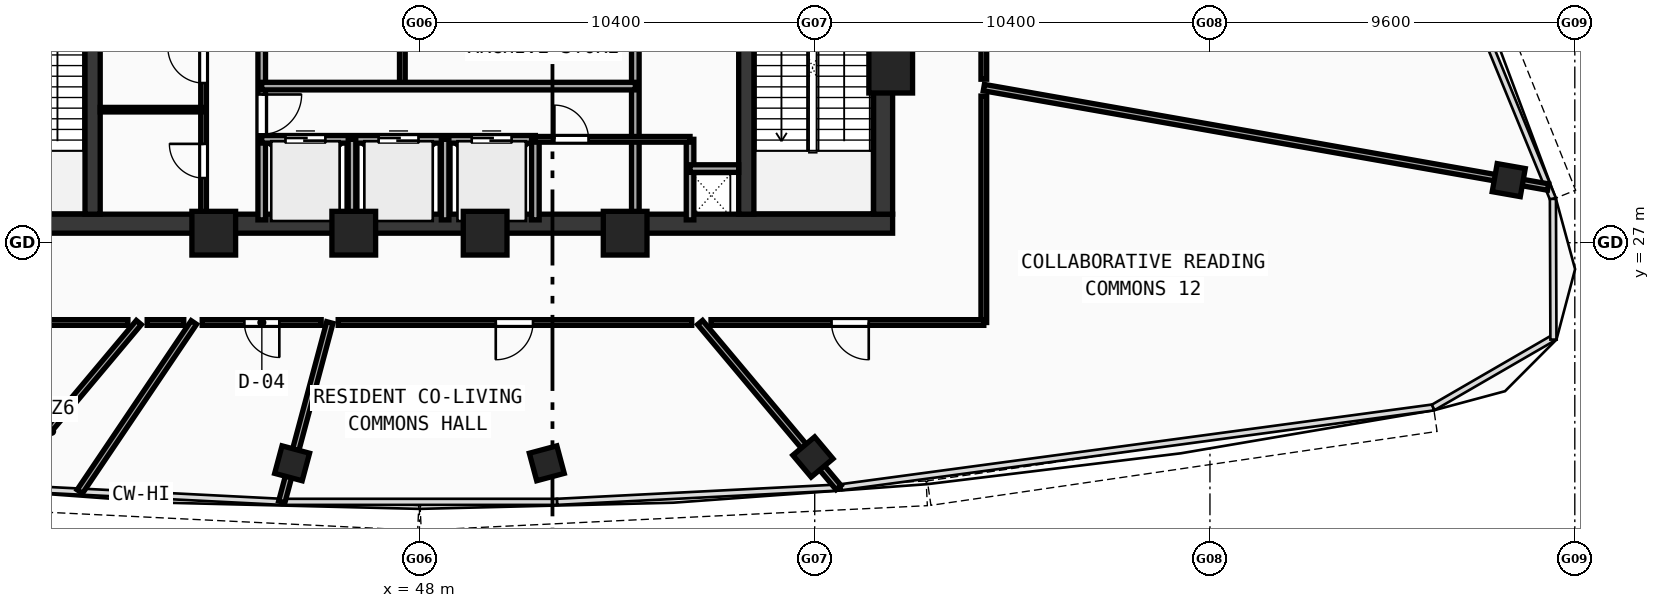
"""IFC4 building model, lengths in metres.
Left out: names, types, materials, properties, quantities, classifications, styles, units other than length and angle.
Written with IfcOpenShell. Run it as: python <this file> out.ifc"""

import sys

from ifc_helpers import new_model, si_unit, direction, frame, frame_2d, origin, origin_with_axes, origin_2d, place, context, subcontext, project, spatial, rectangle, hollow_rectangle, extrude, source, transform, mapped, element, fill, save


model = new_model("IFC4")
c1 = context("Model", 3, precision=1e-05, world=origin(), true_north=direction((0.0, 1.0)))
c2 = subcontext(c1, "Body", "Model", "MODEL_VIEW")
j1 = project(units=[si_unit("LENGTHUNIT", "METRE"), si_unit("PLANEANGLEUNIT", "RADIAN")], contexts=[c1])
p1 = place(None, origin())
s1 = spatial("IfcSite", under=j1, at=p1, CompositionType="ELEMENT")
p2 = place(p1, origin())
s2 = spatial("IfcBuilding", under=s1, at=p2, CompositionType="ELEMENT")
p3 = place(p2, frame((0.0, 0.0, 314.86)))
s3 = spatial("IfcBuildingStorey", under=s2, at=p3, CompositionType="ELEMENT", Elevation=314.86)
p4 = place(p3, frame((35.55, 27.5, 0.0), z_axis=(0.0, 0.0, 1.0), x_axis=(1.0, 0.0, 0.0)))
e1 = element("IfcWall", 1, at=p4, inside=s3, PredefinedType="SHEAR", context=c2, shape_type="SweptSolid", body=[
    extrude(rectangle(XDim=24.9, YDim=0.5, at=frame_2d((12.45, 0.0))), origin(), (0.0, 0.0, 1.0), 5.57),
])
p5 = place(p3, frame((60.2, 27.75, 0.0), z_axis=(0.0, 0.0, 1.0), x_axis=(0.0, 1.0, 0.0)))
e2 = element("IfcWall", 2, at=p5, inside=s3, PredefinedType="SHEAR", context=c2, shape_type="SweptSolid", body=[
    extrude(rectangle(XDim=12.2, YDim=0.5, at=frame_2d((6.1, 0.0))), origin(), (0.0, 0.0, 1.0), 5.57),
])
p6 = place(p3, frame((39.4, 27.75, 0.0), z_axis=(0.0, 0.0, 1.0), x_axis=(0.0, 1.0, 0.0)))
e3 = element("IfcWall", 3, at=p6, inside=s3, PredefinedType="SHEAR", context=c2, shape_type="SweptSolid", body=[
    extrude(rectangle(XDim=12.2, YDim=0.4, at=frame_2d((6.1, 0.0))), origin(), (0.0, 0.0, 1.0), 5.57),
])
p7 = place(p6, frame((10.0, 0.0, 0.0)))
e4 = element("IfcOpeningElement", 4, at=p7, cuts=e3, PredefinedType="OPENING", context=c2, shape_type="SweptSolid", body=[
    extrude(rectangle(XDim=1.1, YDim=2.1, at=frame_2d((0.55, 1.05))), frame((0.0, 0.21, 0.0), z_axis=(0.0, -1.0, 0.0), x_axis=(1.0, 0.0, 0.0)), (0.0, 0.0, 1.0), 0.42),
])
p8 = place(p3, frame((56.6, 27.75, 0.0), z_axis=(0.0, 0.0, 1.0), x_axis=(0.0, 1.0, 0.0)))
e5 = element("IfcWall", 5, at=p8, inside=s3, PredefinedType="SHEAR", context=c2, shape_type="SweptSolid", body=[
    extrude(rectangle(XDim=12.2, YDim=0.4, at=frame_2d((6.1, 0.0))), origin(), (0.0, 0.0, 1.0), 5.57),
])
p9 = place(p8, frame((10.0, 0.0, 0.0)))
e6 = element("IfcOpeningElement", 6, at=p9, cuts=e5, PredefinedType="OPENING", context=c2, shape_type="SweptSolid", body=[
    extrude(rectangle(XDim=1.1, YDim=2.1, at=frame_2d((0.55, 1.05))), frame((0.0, 0.21, 0.0), z_axis=(0.0, -1.0, 0.0), x_axis=(1.0, 0.0, 0.0)), (0.0, 0.0, 1.0), 0.42),
])
m1 = source(origin(), c2, "Body", "SweptSolid", [
    extrude(hollow_rectangle(XDim=1.15, YDim=1.15, WallThickness=0.048, at=origin_2d()), origin(), (0.0, 0.0, 1.0), 5.83),
])
for number, where, z_axis, x_axis in (
    (7, (42.588, 27.25, -0.26), (0.0, 0.0, 1.0), (1.0, 0.0, 0.0)),
    (8, (46.272, 27.25, -0.26), (0.0, 0.0, 1.0), (1.0, 0.0, 0.0)),
    (9, (49.729, 27.25, -0.26), (0.0, 0.0, 1.0), (1.0, 0.0, 0.0)),
    (10, (53.412, 27.25, -0.26), (0.0, 0.0, 1.0), (1.0, 0.0, 0.0)),
    (11, (60.4, 31.513, -0.26), (0.0, 0.0, 1.0), (1.0, 0.0, 0.0)),
):
    element("IfcColumn", number, at=place(p3, frame(where, z_axis=z_axis, x_axis=x_axis)), inside=s3, PredefinedType="COLUMN", context=c2, shape_type="MappedRepresentation", body=[
        mapped(m1, transform((0.0, 0.0, 0.0), scale=1.0)),
    ])
m2 = source(origin(), c2, "Body", "SweptSolid", [
    extrude(hollow_rectangle(XDim=0.75, YDim=0.75, WallThickness=0.028, at=origin_2d()), origin(), (0.0, 0.0, 1.0), 5.83),
])
for number, where, z_axis, x_axis in (
    (12, (44.649, 21.196, -0.26), (0.0, 0.0, 1.0), (0.966, -0.259, 0.0)),
    (13, (51.351, 21.196, -0.26), (0.0, 0.0, 1.0), (0.966, 0.259, 0.0)),
    (14, (58.354, 21.362, -0.26), (0.0, 0.0, 1.0), (0.766, 0.643, 0.0)),
    (15, (76.662, 28.646, -0.26), (0.0, 0.0, 1.0), (0.174, 0.985, 0.0)),
):
    element("IfcColumn", number, at=place(p3, frame(where, z_axis=z_axis, x_axis=x_axis)), inside=s3, PredefinedType="COLUMN", context=c2, shape_type="MappedRepresentation", body=[
        mapped(m2, transform((0.0, 0.0, 0.0), scale=1.0)),
    ])
p10 = place(p3, frame((43.85, 27.6, 0.0), z_axis=(0.0, 0.0, 1.0), x_axis=(0.0, 1.0, 0.0)))
e16 = element("IfcWall", 16, at=p10, inside=s3, PredefinedType="SOLIDWALL", context=c2, shape_type="SweptSolid", body=[
    extrude(rectangle(XDim=6.22, YDim=0.2, at=frame_2d((3.11, 0.0))), origin(), (0.0, 0.0, 1.0), 5.57),
])
p11 = place(p10, frame((2.25, 0.0, 0.0)))
e17 = element("IfcOpeningElement", 17, at=p11, cuts=e16, PredefinedType="OPENING", context=c2, shape_type="SweptSolid", body=[
    extrude(rectangle(XDim=1.05, YDim=2.1, at=frame_2d((0.525, 1.05))), frame((0.0, 0.11, 0.0), z_axis=(0.0, -1.0, 0.0), x_axis=(1.0, 0.0, 0.0)), (0.0, 0.0, 1.0), 0.22),
])
p12 = place(p3, frame((53.68, 27.6, 0.0), z_axis=(0.0, 0.0, 1.0), x_axis=(0.0, 1.0, 0.0)))
e18 = element("IfcWall", 18, at=p12, inside=s3, PredefinedType="SOLIDWALL", context=c2, shape_type="SweptSolid", body=[
    extrude(rectangle(XDim=9.05, YDim=0.2, at=frame_2d((4.525, 0.0))), origin(), (0.0, 0.0, 1.0), 2.22),
])
p13 = place(p12, frame((6.9, 0.0, 0.0)))
e19 = element("IfcOpeningElement", 19, at=p13, cuts=e18, PredefinedType="OPENING", context=c2, shape_type="SweptSolid", body=[
    extrude(rectangle(XDim=1.05, YDim=2.1, at=frame_2d((0.525, 1.05))), frame((0.0, 0.11, 0.0), z_axis=(0.0, -1.0, 0.0), x_axis=(1.0, 0.0, 0.0)), (0.0, 0.0, 1.0), 0.22),
])
p14 = place(p3, frame((47.55, 31.12, 0.0), z_axis=(0.0, 0.0, 1.0), x_axis=(0.0, 1.0, 0.0)))
e20 = element("IfcWall", 20, at=p14, inside=s3, PredefinedType="PARTITIONING", context=c2, shape_type="SweptSolid", body=[
    extrude(rectangle(XDim=2.7, YDim=0.15, at=frame_2d((1.35, 0.0))), origin(), (0.0, 0.0, 1.0), 5.57),
])
p15 = place(p3, frame((43.85, 29.72, 0.0), z_axis=(0.0, 0.0, 1.0), x_axis=(1.0, 0.0, 0.0)))
e21 = element("IfcWall", 21, at=p15, inside=s3, PredefinedType="SOLIDWALL", context=c2, shape_type="SweptSolid", body=[
    extrude(rectangle(XDim=7.2, YDim=0.2, at=frame_2d((3.6, 0.0))), origin(), (0.0, 0.0, 1.0), 5.57),
])
p16 = place(p15, frame((0.625, 0.0, 0.0)))
e22 = element("IfcOpeningElement", 22, at=p16, cuts=e21, PredefinedType="OPENING", context=c2, shape_type="SweptSolid", body=[
    extrude(rectangle(XDim=1.05, YDim=2.1, at=frame_2d((0.525, 1.05))), frame((0.0, 0.11, 0.0), z_axis=(0.0, -1.0, 0.0), x_axis=(1.0, 0.0, 0.0)), (0.0, 0.0, 1.0), 0.22),
])
p17 = place(p15, frame((3.075, 0.0, 0.0)))
e23 = element("IfcOpeningElement", 23, at=p17, cuts=e21, PredefinedType="OPENING", context=c2, shape_type="SweptSolid", body=[
    extrude(rectangle(XDim=1.05, YDim=2.1, at=frame_2d((0.525, 1.05))), frame((0.0, 0.11, 0.0), z_axis=(0.0, -1.0, 0.0), x_axis=(1.0, 0.0, 0.0)), (0.0, 0.0, 1.0), 0.22),
])
p18 = place(p15, frame((5.525, 0.0, 0.0)))
e24 = element("IfcOpeningElement", 24, at=p18, cuts=e21, PredefinedType="OPENING", context=c2, shape_type="SweptSolid", body=[
    extrude(rectangle(XDim=1.05, YDim=2.1, at=frame_2d((0.525, 1.05))), frame((0.0, 0.11, 0.0), z_axis=(0.0, -1.0, 0.0), x_axis=(1.0, 0.0, 0.0)), (0.0, 0.0, 1.0), 0.22),
])
p19 = place(p3, frame((51.05, 27.6, 0.0), z_axis=(0.0, 0.0, 1.0), x_axis=(0.0, 1.0, 0.0)))
e25 = element("IfcWall", 25, at=p19, inside=s3, PredefinedType="SOLIDWALL", context=c2, shape_type="SweptSolid", body=[
    extrude(rectangle(XDim=2.12, YDim=0.2, at=frame_2d((1.06, 0.0))), origin(), (0.0, 0.0, 1.0), 5.57),
])
p20 = place(p3, frame((43.85, 31.12, 0.0), z_axis=(0.0, 0.0, 1.0), x_axis=(1.0, 0.0, 0.0)))
e26 = element("IfcWall", 26, at=p20, inside=s3, PredefinedType="SOLIDWALL", context=c2, shape_type="SweptSolid", body=[
    extrude(rectangle(XDim=9.83, YDim=0.2, at=frame_2d((4.915, 0.0))), origin(), (0.0, 0.0, 1.0), 5.57),
])
p21 = place(p3, frame((46.225, 27.6, 0.0), z_axis=(0.0, 0.0, 1.0), x_axis=(0.0, 1.0, 0.0)))
e27 = element("IfcWall", 27, at=p21, inside=s3, PredefinedType="SOLIDWALL", context=c2, shape_type="SweptSolid", body=[
    extrude(rectangle(XDim=2.12, YDim=0.2, at=frame_2d((1.06, 0.0))), origin(), (0.0, 0.0, 1.0), 2.22),
])
for number, where, z_axis, x_axis in (
    (28, (48.675, 27.6, 0.0), (0.0, 0.0, 1.0), (0.0, 1.0, 0.0)),
    (29, (55.12, 27.6, 0.0), (0.0, 0.0, 1.0), (0.0, 1.0, 0.0)),
):
    element("IfcWall", number, at=place(p3, frame(where, z_axis=z_axis, x_axis=x_axis)), inside=s3, PredefinedType="SOLIDWALL", context=c2, shape_type="SweptSolid", body=[
        extrude(rectangle(XDim=2.12, YDim=0.2, at=frame_2d((1.06, 0.0))), origin(), (0.0, 0.0, 1.0), 5.57),
    ])
p22 = place(p3, frame((55.12, 28.95, 0.0), z_axis=(0.0, 0.0, 1.0), x_axis=(1.0, 0.0, 0.0)))
e30 = element("IfcWall", 30, at=p22, inside=s3, PredefinedType="SOLIDWALL", context=c2, shape_type="SweptSolid", body=[
    extrude(rectangle(XDim=1.28, YDim=0.2, at=frame_2d((0.64, 0.0))), origin(), (0.0, 0.0, 1.0), 5.57),
])
p23 = place(p3, frame((42.32, 27.6, 0.0), z_axis=(0.0, 0.0, 1.0), x_axis=(0.0, 1.0, 0.0)))
e31 = element("IfcWall", 31, at=p23, inside=s3, PredefinedType="PARTITIONING", context=c2, shape_type="SweptSolid", body=[
    extrude(rectangle(XDim=5.9, YDim=0.15, at=frame_2d((2.95, 0.0))), origin(), (0.0, 0.0, 1.0), 2.22),
])
p24 = place(p23, frame((1.1, 0.0, 0.0)))
e32 = element("IfcOpeningElement", 32, at=p24, cuts=e31, PredefinedType="OPENING", context=c2, shape_type="SweptSolid", body=[
    extrude(rectangle(XDim=0.9, YDim=2.1, at=frame_2d((0.45, 1.05))), frame((0.0, 0.085, 0.0), z_axis=(0.0, -1.0, 0.0), x_axis=(1.0, 0.0, 0.0)), (0.0, 0.0, 1.0), 0.17),
])
p25 = place(p23, frame((3.6, 0.0, 0.0)))
e33 = element("IfcOpeningElement", 33, at=p25, cuts=e31, PredefinedType="OPENING", context=c2, shape_type="SweptSolid", body=[
    extrude(rectangle(XDim=0.94, YDim=2.1, at=frame_2d((0.47, 1.05))), frame((0.0, 0.085, 0.0), z_axis=(0.0, -1.0, 0.0), x_axis=(1.0, 0.0, 0.0)), (0.0, 0.0, 1.0), 0.17),
])
p26 = place(p3, frame((51.05, 29.72, 0.0), z_axis=(0.0, 0.0, 1.0), x_axis=(1.0, 0.0, 0.0)))
e34 = element("IfcWall", 34, at=p26, inside=s3, PredefinedType="PARTITIONING", context=c2, shape_type="SweptSolid", body=[
    extrude(rectangle(XDim=4.07, YDim=0.15, at=frame_2d((2.035, 0.0))), origin(), (0.0, 0.0, 1.0), 5.57),
])
p27 = place(p26, frame((0.5, 0.0, 0.0)))
e35 = element("IfcOpeningElement", 35, at=p27, cuts=e34, PredefinedType="OPENING", context=c2, shape_type="SweptSolid", body=[
    extrude(rectangle(XDim=0.9, YDim=2.1, at=frame_2d((0.45, 1.05))), frame((0.0, 0.085, 0.0), z_axis=(0.0, -1.0, 0.0), x_axis=(1.0, 0.0, 0.0)), (0.0, 0.0, 1.0), 0.17),
])
p28 = place(p3, frame((39.6, 30.5, 0.0), z_axis=(0.0, 0.0, 1.0), x_axis=(1.0, 0.0, 0.0)))
e36 = element("IfcWall", 36, at=p28, inside=s3, PredefinedType="PARTITIONING", context=c2, shape_type="SweptSolid", body=[
    extrude(rectangle(XDim=2.72, YDim=0.12, at=frame_2d((1.36, 0.0))), origin(), (0.0, 0.0, 1.0), 5.57),
])
p29 = place(p3, frame((40.616, 24.9, 0.0), z_axis=(0.0, 0.0, 1.0), x_axis=(-0.642790029712, -0.76604241247, 0.0)))
e37 = element("IfcWall", 37, at=p29, inside=s3, PredefinedType="PARTITIONING", context=c2, shape_type="SweptSolid", body=[
    extrude(rectangle(XDim=5.669, YDim=0.17, at=frame_2d((2.834, 0.0))), origin(), (0.0, 0.0, 1.0), 2.22),
])
p30 = place(p3, frame((42.064, 24.9, 0.0), z_axis=(0.0, 0.0, 1.0), x_axis=(-0.559175120789, -0.829049566848, 0.0)))
e38 = element("IfcWall", 38, at=p30, inside=s3, PredefinedType="PARTITIONING", context=c2, shape_type="SweptSolid", body=[
    extrude(rectangle(XDim=5.366, YDim=0.17, at=frame_2d((2.683, 0.0))), origin(), (0.0, 0.0, 1.0), 4.97),
])
p31 = place(p3, frame((45.642, 24.9, 0.0), z_axis=(0.0, 0.0, 1.0), x_axis=(-0.258835177065, -0.965921503598, 0.0)))
e39 = element("IfcWall", 39, at=p31, inside=s3, PredefinedType="PARTITIONING", context=c2, shape_type="SweptSolid", body=[
    extrude(rectangle(XDim=4.885, YDim=0.17, at=frame_2d((2.442, 0.0))), origin(), (0.0, 0.0, 1.0), 2.22),
])
p32 = place(p3, frame((55.384, 24.9, 0.0), z_axis=(0.0, 0.0, 1.0), x_axis=(0.642790029712, -0.76604241247, 0.0)))
e40 = element("IfcWall", 40, at=p32, inside=s3, PredefinedType="PARTITIONING", context=c2, shape_type="SweptSolid", body=[
    extrude(rectangle(XDim=5.669, YDim=0.17, at=frame_2d((2.834, 0.0))), origin(), (0.0, 0.0, 1.0), 2.22),
])
p33 = place(p3, frame((62.85, 31.082, 0.0), z_axis=(0.0, 0.0, 1.0), x_axis=(0.984808005161, -0.173646747654, 0.0)))
e41 = element("IfcWall", 41, at=p33, inside=s3, PredefinedType="PARTITIONING", context=c2, shape_type="SweptSolid", body=[
    extrude(rectangle(XDim=15.075, YDim=0.17, at=frame_2d((7.537, 0.0))), origin(), (0.0, 0.0, 1.0), 2.22),
])
p34 = place(p3, frame((62.85, 38.305, 0.0), z_axis=(0.0, 0.0, 1.0), x_axis=(0.0, -1.0, 0.0)))
e42 = element("IfcWall", 42, at=p34, inside=s3, PredefinedType="PARTITIONING", context=c2, shape_type="SweptSolid", body=[
    extrude(rectangle(XDim=7.004, YDim=0.15, at=frame_2d((3.502, 0.0))), origin(), (0.0, 0.0, 1.0), 2.22),
])
p35 = place(p34, frame((3.027, 0.0, 0.0)))
e43 = element("IfcOpeningElement", 43, at=p35, cuts=e42, PredefinedType="OPENING", context=c2, shape_type="SweptSolid", body=[
    extrude(rectangle(XDim=0.98, YDim=2.12, at=frame_2d((0.49, 1.06))), frame((0.0, 0.085, 0.0), z_axis=(0.0, -1.0, 0.0), x_axis=(1.0, 0.0, 0.0)), (0.0, 0.0, 1.0), 0.17),
])
p36 = place(p3, frame((62.85, 30.858, 0.0), z_axis=(0.0, 0.0, 1.0), x_axis=(0.0, -1.0, 0.0)))
e44 = element("IfcWall", 44, at=p36, inside=s3, PredefinedType="PARTITIONING", context=c2, shape_type="SweptSolid", body=[
    extrude(rectangle(XDim=5.958, YDim=0.15, at=frame_2d((2.979, 0.0))), origin(), (0.0, 0.0, 1.0), 2.22),
])
p37 = place(p3, frame((62.85, 24.9, 0.0), z_axis=(0.0, 0.0, 1.0), x_axis=(-1.0, 0.0, 0.0)))
e45 = element("IfcWall", 45, at=p37, inside=s3, PredefinedType="PARTITIONING", context=c2, shape_type="SweptSolid", body=[
    extrude(rectangle(XDim=7.179, YDim=0.15, at=frame_2d((3.589, 0.0))), origin(), (0.0, 0.0, 1.0), 2.22),
])
p38 = place(p37, frame((3.028, 0.0, 0.0)))
e46 = element("IfcOpeningElement", 46, at=p38, cuts=e45, PredefinedType="OPENING", context=c2, shape_type="SweptSolid", body=[
    extrude(rectangle(XDim=0.98, YDim=2.12, at=frame_2d((0.49, 1.06))), frame((0.0, 0.085, 0.0), z_axis=(0.0, -1.0, 0.0), x_axis=(1.0, 0.0, 0.0)), (0.0, 0.0, 1.0), 0.17),
])
p39 = place(p3, frame((55.164, 24.9, 0.0), z_axis=(0.0, 0.0, 1.0), x_axis=(-1.0, 0.0, 0.0)))
e47 = element("IfcWall", 47, at=p39, inside=s3, PredefinedType="PARTITIONING", context=c2, shape_type="SweptSolid", body=[
    extrude(rectangle(XDim=9.302, YDim=0.15, at=frame_2d((4.651, 0.0))), origin(), (0.0, 0.0, 1.0), 2.22),
])
p40 = place(p39, frame((4.176, 0.0, 0.0)))
e48 = element("IfcOpeningElement", 48, at=p40, cuts=e47, PredefinedType="OPENING", context=c2, shape_type="SweptSolid", body=[
    extrude(rectangle(XDim=0.98, YDim=2.12, at=frame_2d((0.49, 1.06))), frame((0.0, 0.085, 0.0), z_axis=(0.0, -1.0, 0.0), x_axis=(1.0, 0.0, 0.0)), (0.0, 0.0, 1.0), 0.17),
])
p41 = place(p3, frame((45.414, 24.9, 0.0), z_axis=(0.0, 0.0, 1.0), x_axis=(-1.0, 0.0, 0.0)))
e49 = element("IfcWall", 49, at=p41, inside=s3, PredefinedType="PARTITIONING", context=c2, shape_type="SweptSolid", body=[
    extrude(rectangle(XDim=3.13, YDim=0.15, at=frame_2d((1.565, 0.0))), origin(), (0.0, 0.0, 1.0), 2.22),
])
p42 = place(p41, frame((1.101, 0.0, 0.0)))
e50 = element("IfcOpeningElement", 50, at=p42, cuts=e49, PredefinedType="OPENING", context=c2, shape_type="SweptSolid", body=[
    extrude(rectangle(XDim=0.92, YDim=2.1, at=frame_2d((0.46, 1.05))), frame((0.0, 0.085, 0.0), z_axis=(0.0, -1.0, 0.0), x_axis=(1.0, 0.0, 0.0)), (0.0, 0.0, 1.0), 0.17),
])
p43 = place(p3, frame((41.799, 24.9, 0.0), z_axis=(0.0, 0.0, 1.0), x_axis=(-1.0, 0.0, 0.0)))
e51 = element("IfcWall", 51, at=p43, inside=s3, PredefinedType="PARTITIONING", context=c2, shape_type="SweptSolid", body=[
    extrude(rectangle(XDim=0.963, YDim=0.15, at=frame_2d((0.481, 0.0))), origin(), (0.0, 0.0, 1.0), 2.22),
])
p44 = place(p3, frame((40.329, 24.9, 0.0), z_axis=(0.0, 0.0, 1.0), x_axis=(-1.0, 0.0, 0.0)))
e52 = element("IfcWall", 52, at=p44, inside=s3, PredefinedType="PARTITIONING", context=c2, shape_type="SweptSolid", body=[
    extrude(rectangle(XDim=7.179, YDim=0.15, at=frame_2d((3.589, 0.0))), origin(), (0.0, 0.0, 1.0), 2.22),
])
p45 = place(p44, frame((3.201, 0.0, 0.0)))
e53 = element("IfcOpeningElement", 53, at=p45, cuts=e52, PredefinedType="OPENING", context=c2, shape_type="SweptSolid", body=[
    extrude(rectangle(XDim=0.98, YDim=2.12, at=frame_2d((0.49, 1.06))), frame((0.0, 0.085, 0.0), z_axis=(0.0, -1.0, 0.0), x_axis=(1.0, 0.0, 0.0)), (0.0, 0.0, 1.0), 0.17),
])
m3 = source(origin(), c2, "Body", "SweptSolid", [
    extrude(rectangle(XDim=1.05, YDim=2.1, at=frame_2d((0.525, 1.05))), frame((0.0, 0.025, 0.0), z_axis=(0.0, -1.0, 0.0), x_axis=(1.0, 0.0, 0.0)), (0.0, 0.0, 1.0), 0.05),
])
p46 = place(p11, frame((1.05, 0.0, 0.0), z_axis=(0.0, 0.0, 1.0), x_axis=(-1.0, 0.0, 0.0)))
e54 = element("IfcDoor", 54, at=p46, inside=s3, OperationType="SINGLE_SWING_LEFT", PredefinedType="DOOR", context=c2, shape_type="MappedRepresentation", body=[
    mapped(m3, transform((0.0, 0.0, 0.0), scale=1.0)),
])
fill(e17, e54)
p47 = place(p16, origin_with_axes())
e55 = element("IfcDoor", 55, at=p47, inside=s3, OperationType="DOUBLE_DOOR_SLIDING", PredefinedType="DOOR", context=c2, shape_type="MappedRepresentation", body=[
    mapped(m3, transform((0.0, 0.0, 0.0), scale=1.0)),
])
fill(e22, e55)
p48 = place(p17, origin_with_axes())
e56 = element("IfcDoor", 56, at=p48, inside=s3, OperationType="DOUBLE_DOOR_SLIDING", PredefinedType="DOOR", context=c2, shape_type="MappedRepresentation", body=[
    mapped(m3, transform((0.0, 0.0, 0.0), scale=1.0)),
])
fill(e23, e56)
p49 = place(p18, origin_with_axes())
e57 = element("IfcDoor", 57, at=p49, inside=s3, OperationType="DOUBLE_DOOR_SLIDING", PredefinedType="DOOR", context=c2, shape_type="MappedRepresentation", body=[
    mapped(m3, transform((0.0, 0.0, 0.0), scale=1.0)),
])
fill(e24, e57)
m4 = source(origin(), c2, "Body", "SweptSolid", [
    extrude(rectangle(XDim=0.9, YDim=2.1, at=frame_2d((0.45, 1.05))), frame((0.0, 0.025, 0.0), z_axis=(0.0, -1.0, 0.0), x_axis=(1.0, 0.0, 0.0)), (0.0, 0.0, 1.0), 0.05),
])
p50 = place(p24, origin_with_axes())
e58 = element("IfcDoor", 58, at=p50, inside=s3, OperationType="SINGLE_SWING_RIGHT", PredefinedType="DOOR", context=c2, shape_type="MappedRepresentation", body=[
    mapped(m4, transform((0.0, 0.0, 0.0), scale=1.0)),
])
fill(e32, e58)
m5 = source(origin(), c2, "Body", "SweptSolid", [
    extrude(rectangle(XDim=0.94, YDim=2.1, at=frame_2d((0.47, 1.05))), frame((0.0, 0.025, 0.0), z_axis=(0.0, -1.0, 0.0), x_axis=(1.0, 0.0, 0.0)), (0.0, 0.0, 1.0), 0.05),
])
p51 = place(p25, origin_with_axes())
e59 = element("IfcDoor", 59, at=p51, inside=s3, OperationType="SINGLE_SWING_RIGHT", PredefinedType="DOOR", context=c2, shape_type="MappedRepresentation", body=[
    mapped(m5, transform((0.0, 0.0, 0.0), scale=1.0)),
])
fill(e33, e59)
p52 = place(p27, origin_with_axes())
e60 = element("IfcDoor", 60, at=p52, inside=s3, OperationType="SINGLE_SWING_LEFT", PredefinedType="DOOR", context=c2, shape_type="MappedRepresentation", body=[
    mapped(m4, transform((0.0, 0.0, 0.0), scale=1.0)),
])
fill(e35, e60)
m6 = source(origin(), c2, "Body", "SweptSolid", [
    extrude(rectangle(XDim=0.92, YDim=2.1, at=frame_2d((0.46, 1.05))), frame((0.0, 0.025, 0.0), z_axis=(0.0, -1.0, 0.0), x_axis=(1.0, 0.0, 0.0)), (0.0, 0.0, 1.0), 0.05),
])
p53 = place(p42, origin_with_axes())
e61 = element("IfcDoor", 61, at=p53, inside=s3, OperationType="SINGLE_SWING_LEFT", PredefinedType="DOOR", context=c2, shape_type="MappedRepresentation", body=[
    mapped(m6, transform((0.0, 0.0, 0.0), scale=1.0)),
])
fill(e50, e61)
m7 = source(origin(), c2, "Body", "SweptSolid", [
    extrude(rectangle(XDim=0.98, YDim=2.12, at=frame_2d((0.49, 1.06))), frame((0.0, 0.025, 0.0), z_axis=(0.0, -1.0, 0.0), x_axis=(1.0, 0.0, 0.0)), (0.0, 0.0, 1.0), 0.05),
])
p54 = place(p40, origin_with_axes())
e62 = element("IfcDoor", 62, at=p54, inside=s3, OperationType="SINGLE_SWING_RIGHT", PredefinedType="DOOR", context=c2, shape_type="MappedRepresentation", body=[
    mapped(m7, transform((0.0, 0.0, 0.0), scale=1.0)),
])
fill(e48, e62)
p55 = place(p38, origin_with_axes())
e63 = element("IfcDoor", 63, at=p55, inside=s3, OperationType="SINGLE_SWING_LEFT", PredefinedType="DOOR", context=c2, shape_type="MappedRepresentation", body=[
    mapped(m7, transform((0.0, 0.0, 0.0), scale=1.0)),
])
fill(e46, e63)
save(model, sys.argv[1])
